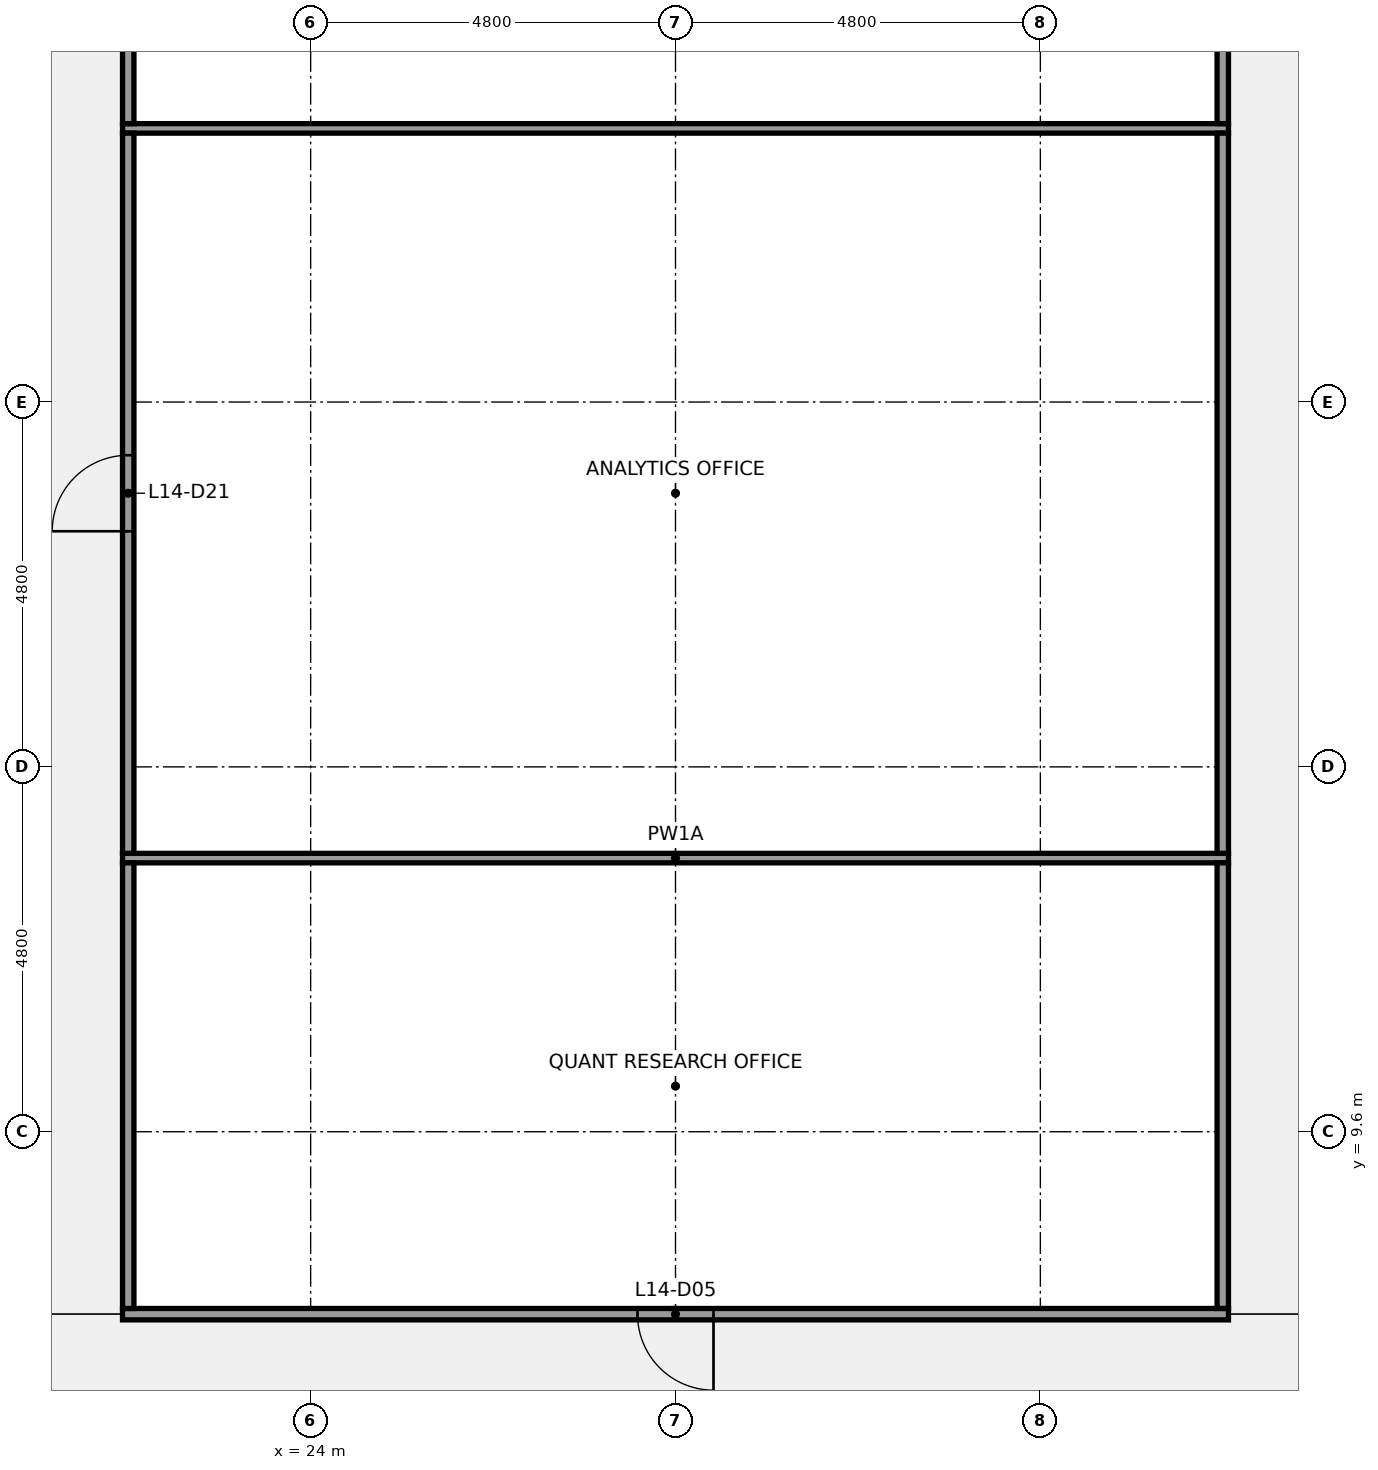
"""IFC4 building model, lengths in metres.
Left out: names, types, materials, properties, quantities, classifications, styles, units other than length and angle.
Written with IfcOpenShell. Run it as: python <this file> out.ifc"""

import sys

from ifc_helpers import new_model, si_unit, direction, frame, frame_2d, origin, place, context, subcontext, project, spatial, rectangle, extrude, element, fill, save


model = new_model("IFC4")
c1 = context("Model", 3, precision=1e-05, world=origin(), true_north=direction((0.0, 1.0)))
c2 = subcontext(c1, "Body", "Model", "MODEL_VIEW")
j1 = project(units=[si_unit("LENGTHUNIT", "METRE"), si_unit("PLANEANGLEUNIT", "RADIAN")], contexts=[c1])
p1 = place(None, origin())
s1 = spatial("IfcSite", under=j1, at=p1, CompositionType="ELEMENT")
p2 = place(p1, origin())
s2 = spatial("IfcBuilding", under=s1, at=p2, CompositionType="ELEMENT")
p3 = place(p2, frame((0.0, 0.0, 67.0)))
s3 = spatial("IfcBuildingStorey", under=s2, at=p3, CompositionType="ELEMENT", Elevation=67.0)
p4 = place(p3, frame((21.525, 7.2, 0.0), z_axis=(0.0, 0.0, 1.0), x_axis=(1.0, 0.0, 0.0)))
e1 = element("IfcWall", 1, at=p4, inside=s3, PredefinedType="PARTITIONING", context=c2, shape_type="SweptSolid", body=[
    extrude(rectangle(XDim=14.55, YDim=0.15, at=frame_2d((7.275, 0.0))), origin(), (0.0, 0.0, 1.0), 2.849),
])
p5 = place(p4, frame((6.775, 0.0, 0.0)))
e2 = element("IfcOpeningElement", 2, at=p5, cuts=e1, PredefinedType="OPENING", context=c2, shape_type="SweptSolid", body=[
    extrude(rectangle(XDim=1.0, YDim=2.1, at=frame_2d((0.5, 1.05))), frame((0.0, 0.085, 0.0), z_axis=(0.0, -1.0, 0.0), x_axis=(1.0, 0.0, 0.0)), (0.0, 0.0, 1.0), 0.17),
])
for number, where, z_axis, x_axis in (
    (3, (21.525, 13.2, 0.0), (0.0, 0.0, 1.0), (1.0, 0.0, 0.0)),
    (4, (21.525, 22.8, 0.0), (0.0, 0.0, 1.0), (1.0, 0.0, 0.0)),
):
    element("IfcWall", number, at=place(p3, frame(where, z_axis=z_axis, x_axis=x_axis)), inside=s3, PredefinedType="PARTITIONING", context=c2, shape_type="SweptSolid", body=[
        extrude(rectangle(XDim=14.55, YDim=0.125, at=frame_2d((7.275, 0.0))), origin(), (0.0, 0.0, 1.0), 2.849),
    ])
p6 = place(p3, frame((21.6, 7.275, 0.0), z_axis=(0.0, 0.0, 1.0), x_axis=(0.0, 1.0, 0.0)))
e5 = element("IfcWall", 5, at=p6, inside=s3, PredefinedType="PARTITIONING", context=c2, shape_type="SweptSolid", body=[
    extrude(rectangle(XDim=5.863, YDim=0.15, at=frame_2d((2.931, 0.0))), origin(), (0.0, 0.0, 1.0), 2.849),
])
p7 = place(p3, frame((21.6, 13.262, 0.0), z_axis=(0.0, 0.0, 1.0), x_axis=(0.0, 1.0, 0.0)))
e6 = element("IfcWall", 6, at=p7, inside=s3, PredefinedType="PARTITIONING", context=c2, shape_type="SweptSolid", body=[
    extrude(rectangle(XDim=9.475, YDim=0.15, at=frame_2d((4.738, 0.0))), origin(), (0.0, 0.0, 1.0), 2.849),
])
p8 = place(p7, frame((4.238, 0.0, 0.0)))
e7 = element("IfcOpeningElement", 7, at=p8, cuts=e6, PredefinedType="OPENING", context=c2, shape_type="SweptSolid", body=[
    extrude(rectangle(XDim=1.0, YDim=2.1, at=frame_2d((0.5, 1.05))), frame((0.0, 0.085, 0.0), z_axis=(0.0, -1.0, 0.0), x_axis=(1.0, 0.0, 0.0)), (0.0, 0.0, 1.0), 0.17),
])
p9 = place(p3, frame((21.6, 22.863, 0.0), z_axis=(0.0, 0.0, 1.0), x_axis=(0.0, 1.0, 0.0)))
e8 = element("IfcWall", 8, at=p9, inside=s3, PredefinedType="PARTITIONING", context=c2, shape_type="SweptSolid", body=[
    extrude(rectangle(XDim=8.275, YDim=0.15, at=frame_2d((4.137, 0.0))), origin(), (0.0, 0.0, 1.0), 2.849),
])
p10 = place(p9, frame((3.637, 0.0, 0.0)))
e9 = element("IfcOpeningElement", 9, at=p10, cuts=e8, PredefinedType="OPENING", context=c2, shape_type="SweptSolid", body=[
    extrude(rectangle(XDim=1.0, YDim=2.1, at=frame_2d((0.5, 1.05))), frame((0.0, 0.085, 0.0), z_axis=(0.0, -1.0, 0.0), x_axis=(1.0, 0.0, 0.0)), (0.0, 0.0, 1.0), 0.17),
])
p11 = place(p3, frame((36.0, 7.275, 0.0), z_axis=(0.0, 0.0, 1.0), x_axis=(0.0, 1.0, 0.0)))
e10 = element("IfcWall", 10, at=p11, inside=s3, PredefinedType="PARTITIONING", context=c2, shape_type="SweptSolid", body=[
    extrude(rectangle(XDim=5.863, YDim=0.15, at=frame_2d((2.931, 0.0))), origin(), (0.0, 0.0, 1.0), 2.849),
])
p12 = place(p3, frame((36.0, 13.262, 0.0), z_axis=(0.0, 0.0, 1.0), x_axis=(0.0, 1.0, 0.0)))
e11 = element("IfcWall", 11, at=p12, inside=s3, PredefinedType="PARTITIONING", context=c2, shape_type="SweptSolid", body=[
    extrude(rectangle(XDim=9.475, YDim=0.15, at=frame_2d((4.738, 0.0))), origin(), (0.0, 0.0, 1.0), 2.849),
])
p13 = place(p3, frame((36.0, 22.863, 0.0), z_axis=(0.0, 0.0, 1.0), x_axis=(0.0, 1.0, 0.0)))
e12 = element("IfcWall", 12, at=p13, inside=s3, PredefinedType="PARTITIONING", context=c2, shape_type="SweptSolid", body=[
    extrude(rectangle(XDim=8.275, YDim=0.15, at=frame_2d((4.137, 0.0))), origin(), (0.0, 0.0, 1.0), 2.849),
])
p14 = place(p5, origin())
e13 = element("IfcDoor", 13, at=p14, inside=s3, OperationType="SINGLE_SWING_RIGHT", PredefinedType="DOOR", context=c2, shape_type="SweptSolid", body=[
    extrude(rectangle(XDim=1.0, YDim=2.1, at=frame_2d((0.5, 1.05))), frame((0.0, 0.025, 0.0), z_axis=(0.0, -1.0, 0.0), x_axis=(1.0, 0.0, 0.0)), (0.0, 0.0, 1.0), 0.05),
])
fill(e2, e13)
p15 = place(p8, origin())
e14 = element("IfcDoor", 14, at=p15, inside=s3, OperationType="SINGLE_SWING_LEFT", PredefinedType="DOOR", context=c2, shape_type="SweptSolid", body=[
    extrude(rectangle(XDim=1.0, YDim=2.1, at=frame_2d((0.5, 1.05))), frame((0.0, 0.025, 0.0), z_axis=(0.0, -1.0, 0.0), x_axis=(1.0, 0.0, 0.0)), (0.0, 0.0, 1.0), 0.05),
])
fill(e7, e14)
save(model, sys.argv[1])
